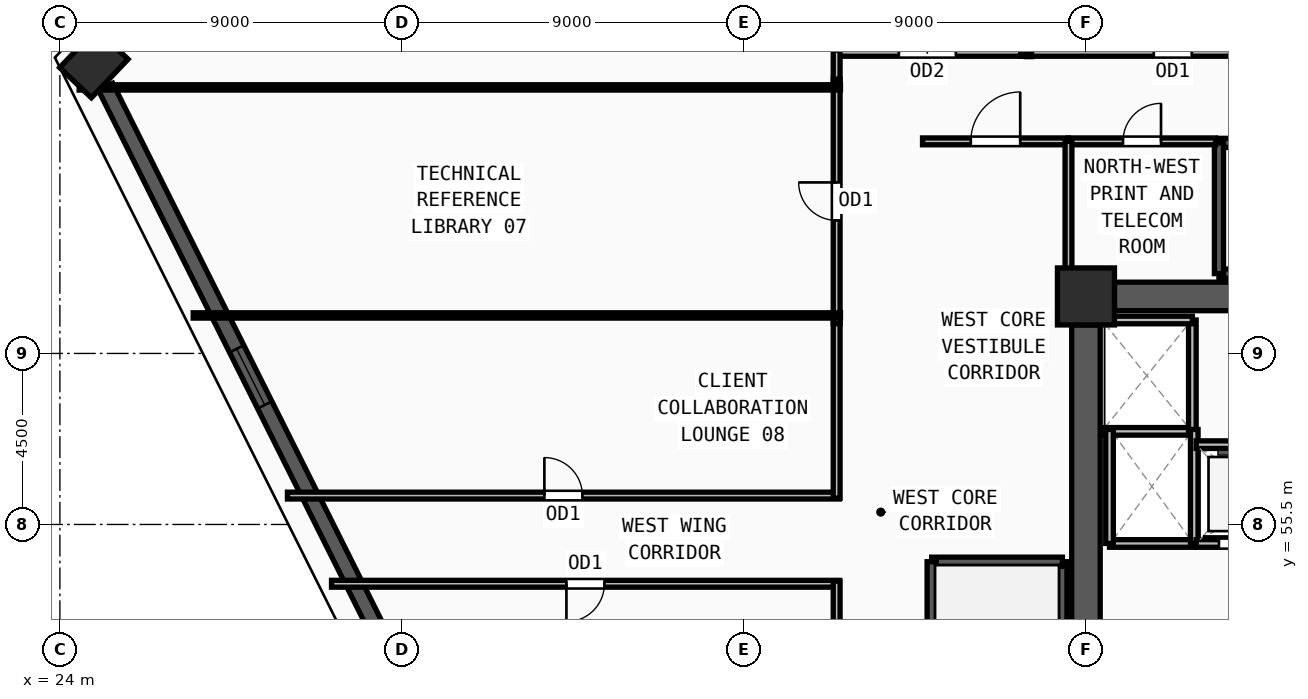
"""IFC4 building model, lengths in metres.
Left out: names, types, materials, properties, quantities, classifications, styles, units other than length and angle.
Written with IfcOpenShell. Run it as: python <this file> out.ifc"""

import sys

from ifc_helpers import new_model, si_unit, direction, frame, frame_2d, origin, origin_2d, place, context, subcontext, project, spatial, rectangle, extrude, source, transform, mapped, element, fill, save


model = new_model("IFC4")
c1 = context("Model", 3, precision=1e-05, world=origin(), true_north=direction((0.0, 1.0)))
c2 = subcontext(c1, "Body", "Model", "MODEL_VIEW")
j1 = project(units=[si_unit("LENGTHUNIT", "METRE"), si_unit("PLANEANGLEUNIT", "RADIAN")], contexts=[c1])
p1 = place(None, origin())
s1 = spatial("IfcSite", under=j1, at=p1, CompositionType="ELEMENT")
p2 = place(p1, origin())
s2 = spatial("IfcBuilding", under=s1, at=p2, CompositionType="ELEMENT")
p3 = place(p2, frame((0.0, 0.0, 155.25)))
s3 = spatial("IfcBuildingStorey", under=s2, at=p3, CompositionType="ELEMENT", Elevation=155.25)
m1 = source(origin(), c2, "Body", "SweptSolid", [
    extrude(rectangle(XDim=1.5, YDim=1.5, at=origin_2d()), origin(), (0.0, 0.0, 1.0), 3.75),
])
p4 = place(p3, frame((51.0, 61.5, 0.0), z_axis=(0.0, 0.0, 1.0), x_axis=(1.0, 0.0, 0.0)))
e1 = element("IfcColumn", 1, at=p4, inside=s3, PredefinedType="COLUMN", context=c2, shape_type="MappedRepresentation", body=[
    mapped(m1, transform((0.0, 0.0, 0.0), x_axis=(1.0, 0.0, 0.0), y_axis=(0.0, 1.0, 0.0), z_axis=(0.0, 0.0, 1.0), scale=1.0)),
])
m2 = source(origin(), c2, "Body", "SweptSolid", [
    extrude(rectangle(XDim=1.4, YDim=1.15, at=origin_2d()), origin(), (0.0, 0.0, 1.0), 3.75),
])
p5 = place(p3, frame((24.895, 67.631, 0.0), z_axis=(0.0, 0.0, 1.0), x_axis=(0.68936671806, 0.724412539946, 0.0)))
e2 = element("IfcColumn", 2, at=p5, inside=s3, PredefinedType="COLUMN", context=c2, shape_type="MappedRepresentation", body=[
    mapped(m2, transform((0.0, 0.0, 0.0), x_axis=(1.0, 0.0, 0.0), y_axis=(0.0, 1.0, 0.0), z_axis=(0.0, 0.0, 1.0), scale=1.0)),
])
p6 = place(p3, frame((25.204, 67.014, 0.0), z_axis=(0.0, 0.0, 1.0), x_axis=(0.447340705753, -0.894363624583, 0.0)))
e3 = element("IfcWall", 3, at=p6, inside=s3, PredefinedType="SOLIDWALL", context=c2, shape_type="SweptSolid", body=[
    extrude(rectangle(XDim=30.73, YDim=0.42, at=frame_2d((15.365, 0.0))), origin(), (0.0, 0.0, 1.0), 3.57),
])
m3 = source(origin(), c2, "Body", "SweptSolid", [
    extrude(rectangle(XDim=1.65, YDim=1.95, at=frame_2d((0.825, 0.975))), frame((0.0, 0.22, 0.0), z_axis=(0.0, -1.0, 0.0), x_axis=(1.0, 0.0, 0.0)), (0.0, 0.0, 1.0), 0.44),
])
p7 = place(p6, frame((7.708, 0.0, 0.55)))
e4 = element("IfcOpeningElement", 4, at=p7, cuts=e3, PredefinedType="OPENING", context=c2, shape_type="MappedRepresentation", body=[
    mapped(m3, transform((0.0, 0.0, 0.0), x_axis=(1.0, 0.0, 0.0), y_axis=(0.0, 1.0, 0.0), z_axis=(0.0, 0.0, 1.0), scale=1.0)),
])
p8 = place(p6, frame((16.09, 0.0, 0.55)))
e5 = element("IfcOpeningElement", 5, at=p8, cuts=e3, PredefinedType="OPENING", context=c2, shape_type="MappedRepresentation", body=[
    mapped(m3, transform((0.0, 0.0, 0.0), x_axis=(1.0, 0.0, 0.0), y_axis=(0.0, 1.0, 0.0), z_axis=(0.0, 0.0, 1.0), scale=1.0)),
])
p9 = place(p6, frame((21.373, 0.0, 0.55)))
e6 = element("IfcOpeningElement", 6, at=p9, cuts=e3, PredefinedType="OPENING", context=c2, shape_type="MappedRepresentation", body=[
    mapped(m3, transform((0.0, 0.0, 0.0), x_axis=(1.0, 0.0, 0.0), y_axis=(0.0, 1.0, 0.0), z_axis=(0.0, 0.0, 1.0), scale=1.0)),
])
p10 = place(p3, frame((51.75, 61.5, 0.0), z_axis=(0.0, 0.0, 1.0), x_axis=(1.0, 0.0, 0.0)))
e7 = element("IfcWall", 7, at=p10, inside=s3, PredefinedType="SHEAR", context=c2, shape_type="SweptSolid", body=[
    extrude(rectangle(XDim=7.5, YDim=0.75, at=frame_2d((3.75, 0.0))), origin(), (0.0, 0.0, 1.0), 3.57),
])
p11 = place(p3, frame((51.0, 47.25, 0.0), z_axis=(0.0, 0.0, 1.0), x_axis=(0.0, 1.0, 0.0)))
e8 = element("IfcWall", 8, at=p11, inside=s3, PredefinedType="SHEAR", context=c2, shape_type="SweptSolid", body=[
    extrude(rectangle(XDim=13.5, YDim=0.75, at=frame_2d((6.75, 0.0))), origin(), (0.0, 0.0, 1.0), 3.57),
])
p12 = place(p3, frame((50.38, 46.7, 0.0), z_axis=(0.0, 0.0, 1.0), x_axis=(0.0, 1.0, 0.0)))
e9 = element("IfcWall", 9, at=p12, inside=s3, PredefinedType="SOLIDWALL", context=c2, shape_type="SweptSolid", body=[
    extrude(rectangle(XDim=7.82, YDim=0.24, at=frame_2d((3.91, 0.0))), origin(), (0.0, 0.0, 1.0), 3.57),
])
p13 = place(p3, frame((50.38, 54.52, 0.0), z_axis=(0.0, 0.0, 1.0), x_axis=(-1.0, 0.0, 0.0)))
e10 = element("IfcWall", 10, at=p13, inside=s3, PredefinedType="SOLIDWALL", context=c2, shape_type="SweptSolid", body=[
    extrude(rectangle(XDim=3.44, YDim=0.24, at=frame_2d((1.72, 0.0))), origin(), (0.0, 0.0, 1.0), 3.57),
])
p14 = place(p3, frame((46.94, 54.52, 0.0), z_axis=(0.0, 0.0, 1.0), x_axis=(0.0, -1.0, 0.0)))
e11 = element("IfcWall", 11, at=p14, inside=s3, PredefinedType="SOLIDWALL", context=c2, shape_type="SweptSolid", body=[
    extrude(rectangle(XDim=7.82, YDim=0.24, at=frame_2d((3.91, 0.0))), origin(), (0.0, 0.0, 1.0), 3.57),
])
m4 = source(origin(), c2, "Body", "SweptSolid", [
    extrude(rectangle(XDim=1.2, YDim=2.2, at=frame_2d((0.6, 1.1))), frame((0.0, 0.13, 0.0), z_axis=(0.0, -1.0, 0.0), x_axis=(1.0, 0.0, 0.0)), (0.0, 0.0, 1.0), 0.26),
])
p15 = place(p14, frame((6.3, 0.0, 0.0)))
e12 = element("IfcOpeningElement", 12, at=p15, cuts=e11, PredefinedType="OPENING", context=c2, shape_type="MappedRepresentation", body=[
    mapped(m4, transform((0.0, 0.0, 0.0), x_axis=(1.0, 0.0, 0.0), y_axis=(0.0, 1.0, 0.0), z_axis=(0.0, 0.0, 1.0), scale=1.0)),
])
p16 = place(p3, frame((54.5, 62.1, 0.0), z_axis=(0.0, 0.0, 1.0), x_axis=(1.0, 0.0, 0.0)))
e13 = element("IfcWall", 13, at=p16, inside=s3, PredefinedType="SOLIDWALL", context=c2, shape_type="SweptSolid", body=[
    extrude(rectangle(XDim=7.82, YDim=0.24, at=frame_2d((3.91, 0.0))), origin(), (0.0, 0.0, 1.0), 3.57),
])
p17 = place(p3, frame((62.32, 65.54, 0.0), z_axis=(0.0, 0.0, 1.0), x_axis=(-1.0, 0.0, 0.0)))
e14 = element("IfcWall", 14, at=p17, inside=s3, PredefinedType="SOLIDWALL", context=c2, shape_type="SweptSolid", body=[
    extrude(rectangle(XDim=7.82, YDim=0.24, at=frame_2d((3.91, 0.0))), origin(), (0.0, 0.0, 1.0), 3.57),
])
p18 = place(p17, frame((6.3, 0.0, 0.0)))
e15 = element("IfcOpeningElement", 15, at=p18, cuts=e14, PredefinedType="OPENING", context=c2, shape_type="MappedRepresentation", body=[
    mapped(m4, transform((0.0, 0.0, 0.0), x_axis=(1.0, 0.0, 0.0), y_axis=(0.0, 1.0, 0.0), z_axis=(0.0, 0.0, 1.0), scale=1.0)),
])
p19 = place(p3, frame((54.5, 65.54, 0.0), z_axis=(0.0, 0.0, 1.0), x_axis=(0.0, -1.0, 0.0)))
e16 = element("IfcWall", 16, at=p19, inside=s3, PredefinedType="SOLIDWALL", context=c2, shape_type="SweptSolid", body=[
    extrude(rectangle(XDim=3.44, YDim=0.24, at=frame_2d((1.72, 0.0))), origin(), (0.0, 0.0, 1.0), 3.57),
])
p20 = place(p3, frame((51.4, 57.95, 0.0), z_axis=(0.0, 0.0, 1.0), x_axis=(1.0, 0.0, 0.0)))
e17 = element("IfcWall", 17, at=p20, inside=s3, PredefinedType="SOLIDWALL", context=c2, shape_type="SweptSolid", body=[
    extrude(rectangle(XDim=2.4, YDim=0.2, at=frame_2d((1.2, 0.0))), origin(), (0.0, 0.0, 1.0), 3.57),
])
p21 = place(p3, frame((53.8, 57.95, 0.0), z_axis=(0.0, 0.0, 1.0), x_axis=(0.0, 1.0, 0.0)))
e18 = element("IfcWall", 18, at=p21, inside=s3, PredefinedType="SOLIDWALL", context=c2, shape_type="SweptSolid", body=[
    extrude(rectangle(XDim=2.93, YDim=0.2, at=frame_2d((1.465, 0.0))), origin(), (0.0, 0.0, 1.0), 3.57),
])
p22 = place(p3, frame((53.8, 60.88, 0.0), z_axis=(0.0, 0.0, 1.0), x_axis=(-1.0, 0.0, 0.0)))
e19 = element("IfcWall", 19, at=p22, inside=s3, PredefinedType="SOLIDWALL", context=c2, shape_type="SweptSolid", body=[
    extrude(rectangle(XDim=2.4, YDim=0.2, at=frame_2d((1.2, 0.0))), origin(), (0.0, 0.0, 1.0), 3.57),
])
p23 = place(p3, frame((51.62, 55.0, 0.0), z_axis=(0.0, 0.0, 1.0), x_axis=(1.0, 0.0, 0.0)))
e20 = element("IfcWall", 20, at=p23, inside=s3, PredefinedType="SOLIDWALL", context=c2, shape_type="SweptSolid", body=[
    extrude(rectangle(XDim=2.23, YDim=0.2, at=frame_2d((1.115, 0.0))), origin(), (0.0, 0.0, 1.0), 3.57),
])
for number, where, z_axis, x_axis in (
    (21, (53.85, 55.0, 0.0), (0.0, 0.0, 1.0), (0.0, 1.0, 0.0)),
    (22, (51.62, 58.0, 0.0), (0.0, 0.0, 1.0), (0.0, -1.0, 0.0)),
):
    element("IfcWall", number, at=place(p3, frame(where, z_axis=z_axis, x_axis=x_axis)), inside=s3, PredefinedType="SOLIDWALL", context=c2, shape_type="SweptSolid", body=[
        extrude(rectangle(XDim=3.0, YDim=0.2, at=frame_2d((1.5, 0.0))), origin(), (0.0, 0.0, 1.0), 3.57),
    ])
p24 = place(p3, frame((53.9, 55.0, 0.0), z_axis=(0.0, 0.0, 1.0), x_axis=(1.0, 0.0, 0.0)))
e23 = element("IfcWall", 23, at=p24, inside=s3, PredefinedType="SOLIDWALL", context=c2, shape_type="SweptSolid", body=[
    extrude(rectangle(XDim=2.3, YDim=0.2, at=frame_2d((1.15, 0.0))), origin(), (0.0, 0.0, 1.0), 3.57),
])
m5 = source(origin(), c2, "Body", "SweptSolid", [
    extrude(rectangle(XDim=1.1, YDim=2.2, at=frame_2d((0.55, 1.1))), frame((0.0, 0.11, 0.0), z_axis=(0.0, -1.0, 0.0), x_axis=(1.0, 0.0, 0.0)), (0.0, 0.0, 1.0), 0.22),
])
p25 = place(p24, frame((0.6, 0.0, 0.0)))
e24 = element("IfcOpeningElement", 24, at=p25, cuts=e23, PredefinedType="OPENING", context=c2, shape_type="MappedRepresentation", body=[
    mapped(m5, transform((0.0, 0.0, 0.0), x_axis=(1.0, 0.0, 0.0), y_axis=(0.0, 1.0, 0.0), z_axis=(0.0, 0.0, 1.0), scale=1.0)),
])
p26 = place(p3, frame((56.2, 57.6, 0.0), z_axis=(0.0, 0.0, 1.0), x_axis=(-1.0, 0.0, 0.0)))
e25 = element("IfcWall", 25, at=p26, inside=s3, PredefinedType="SOLIDWALL", context=c2, shape_type="SweptSolid", body=[
    extrude(rectangle(XDim=2.3, YDim=0.2, at=frame_2d((1.15, 0.0))), origin(), (0.0, 0.0, 1.0), 3.57),
])
p27 = place(p3, frame((50.54, 65.58, 0.0), z_axis=(0.0, 0.0, 1.0), x_axis=(1.0, 0.0, 0.0)))
e26 = element("IfcWall", 26, at=p27, inside=s3, PredefinedType="PARTITIONING", context=c2, shape_type="SweptSolid", body=[
    extrude(rectangle(XDim=3.87, YDim=0.18, at=frame_2d((1.935, 0.0))), origin(), (0.0, 0.0, 1.0), 3.57),
])
m6 = source(origin(), c2, "Body", "SweptSolid", [
    extrude(rectangle(XDim=1.0, YDim=2.2, at=frame_2d((0.5, 1.1))), frame((0.0, 0.1, 0.0), z_axis=(0.0, -1.0, 0.0), x_axis=(1.0, 0.0, 0.0)), (0.0, 0.0, 1.0), 0.2),
])
p28 = place(p27, frame((1.435, 0.0, 0.0)))
e27 = element("IfcOpeningElement", 27, at=p28, cuts=e26, PredefinedType="OPENING", context=c2, shape_type="MappedRepresentation", body=[
    mapped(m6, transform((0.0, 0.0, 0.0), x_axis=(1.0, 0.0, 0.0), y_axis=(0.0, 1.0, 0.0), z_axis=(0.0, 0.0, 1.0), scale=1.0)),
])
p29 = place(p3, frame((46.7, 65.58, 0.0), z_axis=(0.0, 0.0, 1.0), x_axis=(1.0, 0.0, 0.0)))
e28 = element("IfcWall", 28, at=p29, inside=s3, PredefinedType="PARTITIONING", context=c2, shape_type="SweptSolid", body=[
    extrude(rectangle(XDim=3.84, YDim=0.18, at=frame_2d((1.92, 0.0))), origin(), (0.0, 0.0, 1.0), 3.57),
])
m7 = source(origin(), c2, "Body", "SweptSolid", [
    extrude(rectangle(XDim=1.3, YDim=2.2, at=frame_2d((0.65, 1.1))), frame((0.0, 0.1, 0.0), z_axis=(0.0, -1.0, 0.0), x_axis=(1.0, 0.0, 0.0)), (0.0, 0.0, 1.0), 0.2),
])
p30 = place(p29, frame((1.27, 0.0, 0.0)))
e29 = element("IfcOpeningElement", 29, at=p30, cuts=e28, PredefinedType="OPENING", context=c2, shape_type="MappedRepresentation", body=[
    mapped(m7, transform((0.0, 0.0, 0.0), x_axis=(1.0, 0.0, 0.0), y_axis=(0.0, 1.0, 0.0), z_axis=(0.0, 0.0, 1.0), scale=1.0)),
])
p31 = place(p3, frame((49.285, 67.91, 0.0), z_axis=(0.0, 0.0, 1.0), x_axis=(1.0, 0.0, 0.0)))
e30 = element("IfcWall", 30, at=p31, inside=s3, PredefinedType="PARTITIONING", context=c2, shape_type="SweptSolid", body=[
    extrude(rectangle(XDim=8.0, YDim=0.18, at=frame_2d((4.0, 0.0))), origin(), (0.0, 0.0, 1.0), 3.57),
])
p32 = place(p31, frame((3.5, 0.0, 0.0)))
e31 = element("IfcOpeningElement", 31, at=p32, cuts=e30, PredefinedType="OPENING", context=c2, shape_type="MappedRepresentation", body=[
    mapped(m6, transform((0.0, 0.0, 0.0), x_axis=(1.0, 0.0, 0.0), y_axis=(0.0, 1.0, 0.0), z_axis=(0.0, 0.0, 1.0), scale=1.0)),
])
p33 = place(p3, frame((44.37, 67.91, 0.0), z_axis=(0.0, 0.0, 1.0), x_axis=(1.0, 0.0, 0.0)))
e32 = element("IfcWall", 32, at=p33, inside=s3, PredefinedType="PARTITIONING", context=c2, shape_type="SweptSolid", body=[
    extrude(rectangle(XDim=4.915, YDim=0.18, at=frame_2d((2.458, 0.0))), origin(), (0.0, 0.0, 1.0), 3.57),
])
m8 = source(origin(), c2, "Body", "SweptSolid", [
    extrude(rectangle(XDim=1.5, YDim=2.2, at=frame_2d((0.75, 1.1))), frame((0.0, 0.1, 0.0), z_axis=(0.0, -1.0, 0.0), x_axis=(1.0, 0.0, 0.0)), (0.0, 0.0, 1.0), 0.2),
])
p34 = place(p33, frame((1.707, 0.0, 0.0)))
e33 = element("IfcOpeningElement", 33, at=p34, cuts=e32, PredefinedType="OPENING", context=c2, shape_type="MappedRepresentation", body=[
    mapped(m8, transform((0.0, 0.0, 0.0), x_axis=(1.0, 0.0, 0.0), y_axis=(0.0, 1.0, 0.0), z_axis=(0.0, 0.0, 1.0), scale=1.0)),
])
p35 = place(p3, frame((44.44, 60.785, 0.0), z_axis=(0.0, 0.0, 1.0), x_axis=(0.0, 1.0, 0.0)))
e34 = element("IfcWall", 34, at=p35, inside=s3, PredefinedType="PARTITIONING", context=c2, shape_type="SweptSolid", body=[
    extrude(rectangle(XDim=6.43, YDim=0.18, at=frame_2d((3.215, 0.0))), origin(), (0.0, 0.0, 1.0), 3.57),
])
p36 = place(p35, frame((2.715, 0.0, 0.0)))
e35 = element("IfcOpeningElement", 35, at=p36, cuts=e34, PredefinedType="OPENING", context=c2, shape_type="MappedRepresentation", body=[
    mapped(m6, transform((0.0, 0.0, 0.0), x_axis=(1.0, 0.0, 0.0), y_axis=(0.0, 1.0, 0.0), z_axis=(0.0, 0.0, 1.0), scale=1.0)),
])
p37 = place(p3, frame((29.988, 56.26, 0.0), z_axis=(0.0, 0.0, 1.0), x_axis=(1.0, 0.0, 0.0)))
e36 = element("IfcWall", 36, at=p37, inside=s3, PredefinedType="PARTITIONING", context=c2, shape_type="SweptSolid", body=[
    extrude(rectangle(XDim=14.522, YDim=0.18, at=frame_2d((7.261, 0.0))), origin(), (0.0, 0.0, 1.0), 3.57),
])
p38 = place(p37, frame((6.761, 0.0, 0.0)))
e37 = element("IfcOpeningElement", 37, at=p38, cuts=e36, PredefinedType="OPENING", context=c2, shape_type="MappedRepresentation", body=[
    mapped(m6, transform((0.0, 0.0, 0.0), x_axis=(1.0, 0.0, 0.0), y_axis=(0.0, 1.0, 0.0), z_axis=(0.0, 0.0, 1.0), scale=1.0)),
])
p39 = place(p3, frame((44.51, 53.94, 0.0), z_axis=(0.0, 0.0, 1.0), x_axis=(-1.0, 0.0, 0.0)))
e38 = element("IfcWall", 38, at=p39, inside=s3, PredefinedType="PARTITIONING", context=c2, shape_type="SweptSolid", body=[
    extrude(rectangle(XDim=13.362, YDim=0.18, at=frame_2d((6.681, 0.0))), origin(), (0.0, 0.0, 1.0), 3.57),
])
p40 = place(p39, frame((6.181, 0.0, 0.0)))
e39 = element("IfcOpeningElement", 39, at=p40, cuts=e38, PredefinedType="OPENING", context=c2, shape_type="MappedRepresentation", body=[
    mapped(m6, transform((0.0, 0.0, 0.0), x_axis=(1.0, 0.0, 0.0), y_axis=(0.0, 1.0, 0.0), z_axis=(0.0, 0.0, 1.0), scale=1.0)),
])
p41 = place(p3, frame((50.54, 61.95, 0.0), z_axis=(0.0, 0.0, 1.0), x_axis=(0.0, 1.0, 0.0)))
e40 = element("IfcWall", 40, at=p41, inside=s3, PredefinedType="PARTITIONING", context=c2, shape_type="SweptSolid", body=[
    extrude(rectangle(XDim=3.63, YDim=0.18, at=frame_2d((1.815, 0.0))), origin(), (0.0, 0.0, 1.0), 3.57),
])
p42 = place(p3, frame((44.44, 67.215, 0.0), z_axis=(0.0, 0.0, 1.0), x_axis=(0.0, 1.0, 0.0)))
e41 = element("IfcWall", 41, at=p42, inside=s3, PredefinedType="PARTITIONING", context=c2, shape_type="SweptSolid", body=[
    extrude(rectangle(XDim=0.765, YDim=0.18, at=frame_2d((0.382, 0.0))), origin(), (0.0, 0.0, 1.0), 3.57),
])
p43 = place(p3, frame((44.44, 56.19, 0.0), z_axis=(0.0, 0.0, 1.0), x_axis=(0.0, 1.0, 0.0)))
e42 = element("IfcWall", 42, at=p43, inside=s3, PredefinedType="PARTITIONING", context=c2, shape_type="SweptSolid", body=[
    extrude(rectangle(XDim=4.595, YDim=0.18, at=frame_2d((2.297, 0.0))), origin(), (0.0, 0.0, 1.0), 3.57),
])
p44 = place(p3, frame((44.44, 45.285, 0.0), z_axis=(0.0, 0.0, 1.0), x_axis=(0.0, 1.0, 0.0)))
e43 = element("IfcWall", 43, at=p44, inside=s3, PredefinedType="PARTITIONING", context=c2, shape_type="SweptSolid", body=[
    extrude(rectangle(XDim=8.725, YDim=0.18, at=frame_2d((4.363, 0.0))), origin(), (0.0, 0.0, 1.0), 3.57),
])
p45 = place(p3, frame((44.54, 61.0, 0.0), z_axis=(0.0, 0.0, 1.0), x_axis=(-1.0, 0.0, 0.0)))
e44 = element("IfcWall", 44, at=p45, inside=s3, PredefinedType="PARTITIONING", context=c2, shape_type="SweptSolid", body=[
    extrude(rectangle(XDim=17.032, YDim=0.14, at=frame_2d((8.516, 0.0))), origin(), (0.0, 0.0, 1.0), 3.57),
])
p46 = place(p3, frame((44.54, 67.0, 0.0), z_axis=(0.0, 0.0, 1.0), x_axis=(-1.0, 0.0, 0.0)))
e45 = element("IfcWall", 45, at=p46, inside=s3, PredefinedType="PARTITIONING", context=c2, shape_type="SweptSolid", body=[
    extrude(rectangle(XDim=20.033, YDim=0.14, at=frame_2d((10.017, 0.0))), origin(), (0.0, 0.0, 1.0), 2.755),
])
p47 = place(p3, frame((49.5, 67.81, 0.0), z_axis=(0.0, 0.0, 1.0), x_axis=(0.0, 1.0, 0.0)))
e46 = element("IfcWall", 46, at=p47, inside=s3, PredefinedType="PARTITIONING", context=c2, shape_type="SweptSolid", body=[
    extrude(rectangle(XDim=11.767, YDim=0.14, at=frame_2d((5.883, 0.0))), origin(), (0.0, 0.0, 1.0), 3.57),
])
m9 = source(origin(), c2, "Body", "SweptSolid", [
    extrude(rectangle(XDim=1.65, YDim=1.95, at=frame_2d((0.825, 0.975))), frame((0.0, 0.03, 0.0), z_axis=(0.0, -1.0, 0.0), x_axis=(1.0, 0.0, 0.0)), (0.0, 0.0, 1.0), 0.06),
])
p48 = place(p7, origin())
e47 = element("IfcWindow", 47, at=p48, inside=s3, PartitioningType="DOUBLE_PANEL_VERTICAL", PredefinedType="WINDOW", context=c2, shape_type="MappedRepresentation", body=[
    mapped(m9, transform((0.0, 0.0, 0.0), x_axis=(1.0, 0.0, 0.0), y_axis=(0.0, 1.0, 0.0), z_axis=(0.0, 0.0, 1.0), scale=1.0)),
])
fill(e4, e47)
m10 = source(origin(), c2, "Body", "SweptSolid", [
    extrude(rectangle(XDim=1.1, YDim=2.2, at=frame_2d((0.55, 1.1))), frame((0.0, 0.025, 0.0), z_axis=(0.0, -1.0, 0.0), x_axis=(1.0, 0.0, 0.0)), (0.0, 0.0, 1.0), 0.05),
])
p49 = place(p25, origin())
e48 = element("IfcDoor", 48, at=p49, inside=s3, OperationType="SLIDING_TO_LEFT", PredefinedType="DOOR", context=c2, shape_type="MappedRepresentation", body=[
    mapped(m10, transform((0.0, 0.0, 0.0), x_axis=(1.0, 0.0, 0.0), y_axis=(0.0, 1.0, 0.0), z_axis=(0.0, 0.0, 1.0), scale=1.0)),
])
fill(e24, e48)
m11 = source(origin(), c2, "Body", "SweptSolid", [
    extrude(rectangle(XDim=1.0, YDim=2.2, at=frame_2d((0.5, 1.1))), frame((0.0, 0.025, 0.0), z_axis=(0.0, -1.0, 0.0), x_axis=(1.0, 0.0, 0.0)), (0.0, 0.0, 1.0), 0.05),
])
p50 = place(p28, origin())
e49 = element("IfcDoor", 49, at=p50, inside=s3, OperationType="SINGLE_SWING_RIGHT", PredefinedType="DOOR", context=c2, shape_type="MappedRepresentation", body=[
    mapped(m11, transform((0.0, 0.0, 0.0), x_axis=(1.0, 0.0, 0.0), y_axis=(0.0, 1.0, 0.0), z_axis=(0.0, 0.0, 1.0), scale=1.0)),
])
fill(e27, e49)
m12 = source(origin(), c2, "Body", "SweptSolid", [
    extrude(rectangle(XDim=1.3, YDim=2.2, at=frame_2d((0.65, 1.1))), frame((0.0, 0.025, 0.0), z_axis=(0.0, -1.0, 0.0), x_axis=(1.0, 0.0, 0.0)), (0.0, 0.0, 1.0), 0.05),
])
p51 = place(p30, origin())
e50 = element("IfcDoor", 50, at=p51, inside=s3, OperationType="SINGLE_SWING_RIGHT", PredefinedType="DOOR", context=c2, shape_type="MappedRepresentation", body=[
    mapped(m12, transform((0.0, 0.0, 0.0), x_axis=(1.0, 0.0, 0.0), y_axis=(0.0, 1.0, 0.0), z_axis=(0.0, 0.0, 1.0), scale=1.0)),
])
fill(e29, e50)
p52 = place(p32, origin())
e51 = element("IfcDoor", 51, at=p52, inside=s3, OperationType="SINGLE_SWING_RIGHT", PredefinedType="DOOR", context=c2, shape_type="MappedRepresentation", body=[
    mapped(m11, transform((0.0, 0.0, 0.0), x_axis=(1.0, 0.0, 0.0), y_axis=(0.0, 1.0, 0.0), z_axis=(0.0, 0.0, 1.0), scale=1.0)),
])
fill(e31, e51)
m13 = source(origin(), c2, "Body", "SweptSolid", [
    extrude(rectangle(XDim=1.5, YDim=2.2, at=frame_2d((0.75, 1.1))), frame((0.0, 0.025, 0.0), z_axis=(0.0, -1.0, 0.0), x_axis=(1.0, 0.0, 0.0)), (0.0, 0.0, 1.0), 0.05),
])
p53 = place(p34, origin())
e52 = element("IfcDoor", 52, at=p53, inside=s3, OperationType="DOUBLE_DOOR_SINGLE_SWING", PredefinedType="DOOR", context=c2, shape_type="MappedRepresentation", body=[
    mapped(m13, transform((0.0, 0.0, 0.0), x_axis=(1.0, 0.0, 0.0), y_axis=(0.0, 1.0, 0.0), z_axis=(0.0, 0.0, 1.0), scale=1.0)),
])
fill(e33, e52)
p54 = place(p36, origin())
e53 = element("IfcDoor", 53, at=p54, inside=s3, OperationType="SINGLE_SWING_RIGHT", PredefinedType="DOOR", context=c2, shape_type="MappedRepresentation", body=[
    mapped(m11, transform((0.0, 0.0, 0.0), x_axis=(1.0, 0.0, 0.0), y_axis=(0.0, 1.0, 0.0), z_axis=(0.0, 0.0, 1.0), scale=1.0)),
])
fill(e35, e53)
p55 = place(p38, origin())
e54 = element("IfcDoor", 54, at=p55, inside=s3, OperationType="SINGLE_SWING_LEFT", PredefinedType="DOOR", context=c2, shape_type="MappedRepresentation", body=[
    mapped(m11, transform((0.0, 0.0, 0.0), x_axis=(1.0, 0.0, 0.0), y_axis=(0.0, 1.0, 0.0), z_axis=(0.0, 0.0, 1.0), scale=1.0)),
])
fill(e37, e54)
p56 = place(p40, origin())
e55 = element("IfcDoor", 55, at=p56, inside=s3, OperationType="SINGLE_SWING_RIGHT", PredefinedType="DOOR", context=c2, shape_type="MappedRepresentation", body=[
    mapped(m11, transform((0.0, 0.0, 0.0), x_axis=(1.0, 0.0, 0.0), y_axis=(0.0, 1.0, 0.0), z_axis=(0.0, 0.0, 1.0), scale=1.0)),
])
fill(e39, e55)
save(model, sys.argv[1])
